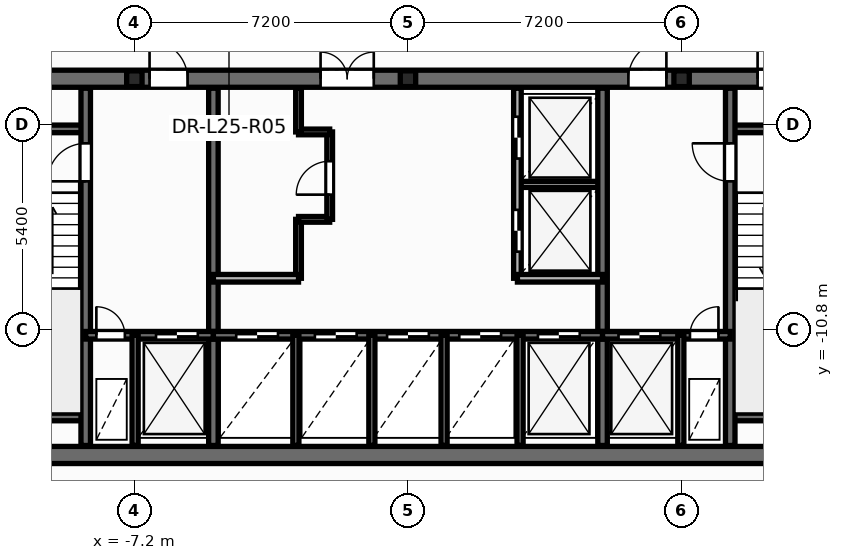
"""IFC4 building model, lengths in metres.
Left out: names, types, materials, properties, quantities, classifications, styles, units other than length and angle.
Written with IfcOpenShell. Run it as: python <this file> out.ifc"""

import sys

from ifc_helpers import new_model, si_unit, direction, frame, frame_2d, origin, origin_2d, place, context, subcontext, project, spatial, rectangle, i_section, extrude, element, fill, save


model = new_model("IFC4")
c1 = context("Model", 3, precision=1e-05, world=origin(), true_north=direction((0.0, 1.0)))
c2 = subcontext(c1, "Body", "Model", "MODEL_VIEW")
j1 = project(units=[si_unit("LENGTHUNIT", "METRE"), si_unit("PLANEANGLEUNIT", "RADIAN")], contexts=[c1])
p1 = place(None, origin())
s1 = spatial("IfcSite", under=j1, at=p1, CompositionType="ELEMENT")
p2 = place(p1, origin())
s2 = spatial("IfcBuilding", under=s1, at=p2, CompositionType="ELEMENT")
p3 = place(p2, frame((0.0, 0.0, 99.6)))
s3 = spatial("IfcBuildingStorey", under=s2, at=p3, CompositionType="ELEMENT", Elevation=99.6)
for number, where, z_axis, x_axis in (
    (1, (-7.2, -4.2, 0.0), (0.0, 0.0, 1.0), (1.0, 0.0, 0.0)),
    (2, (0.0, -4.2, 0.0), (0.0, 0.0, 1.0), (1.0, 0.0, 0.0)),
    (3, (7.2, -4.2, 0.0), (0.0, 0.0, 1.0), (1.0, 0.0, 0.0)),
):
    element("IfcColumn", number, at=place(p3, frame(where, z_axis=z_axis, x_axis=x_axis)), inside=s3, PredefinedType="PILASTER", context=c2, shape_type="SweptSolid", body=[
        extrude(i_section(OverallWidth=0.405, OverallDepth=0.414, WebThickness=0.022, FlangeThickness=0.032, at=origin_2d()), origin(), (0.0, 0.0, 1.0), 3.6),
    ])
p4 = place(p3, frame((-2.88, -9.45, 0.0), z_axis=(0.0, 0.0, 1.0), x_axis=(0.0, 1.0, 0.0)))
e4 = element("IfcWall", 4, at=p4, inside=s3, PredefinedType="PARTITIONING", context=c2, shape_type="SweptSolid", body=[
    extrude(rectangle(XDim=1.55, YDim=0.15, at=frame_2d((0.775, 0.0))), origin(), (0.0, 0.0, 1.0), 3.35),
])
p5 = place(p3, frame((-2.88, -7.9, 0.0), z_axis=(0.0, 0.0, 1.0), x_axis=(1.0, 0.0, 0.0)))
e5 = element("IfcWall", 5, at=p5, inside=s3, PredefinedType="PARTITIONING", context=c2, shape_type="SweptSolid", body=[
    extrude(rectangle(XDim=0.82, YDim=0.15, at=frame_2d((0.41, 0.0))), origin(), (0.0, 0.0, 1.0), 3.35),
])
p6 = place(p3, frame((-2.06, -7.9, 0.0), z_axis=(0.0, 0.0, 1.0), x_axis=(0.0, 1.0, 0.0)))
e6 = element("IfcWall", 6, at=p6, inside=s3, PredefinedType="PARTITIONING", context=c2, shape_type="SweptSolid", body=[
    extrude(rectangle(XDim=2.3, YDim=0.15, at=frame_2d((1.15, 0.0))), origin(), (0.0, 0.0, 1.0), 3.35),
])
p7 = place(p6, frame((0.65, 0.0, 0.0)))
e7 = element("IfcOpeningElement", 7, at=p7, cuts=e6, PredefinedType="OPENING", context=c2, shape_type="SweptSolid", body=[
    extrude(rectangle(XDim=0.886, YDim=2.104, at=frame_2d((0.44, 1.052))), frame((0.0, 0.085, 0.0), z_axis=(0.0, -1.0, 0.0), x_axis=(1.0, 0.0, 0.0)), (0.0, 0.0, 1.0), 0.17),
])
p8 = place(p3, frame((-2.88, -5.6, 0.0), z_axis=(0.0, 0.0, 1.0), x_axis=(1.0, 0.0, 0.0)))
e8 = element("IfcWall", 8, at=p8, inside=s3, PredefinedType="PARTITIONING", context=c2, shape_type="SweptSolid", body=[
    extrude(rectangle(XDim=0.82, YDim=0.15, at=frame_2d((0.41, 0.0))), origin(), (0.0, 0.0, 1.0), 3.35),
])
p9 = place(p3, frame((-2.88, -5.6, 0.0), z_axis=(0.0, 0.0, 1.0), x_axis=(0.0, 1.0, 0.0)))
e9 = element("IfcWall", 9, at=p9, inside=s3, PredefinedType="PARTITIONING", context=c2, shape_type="SweptSolid", body=[
    extrude(rectangle(XDim=1.15, YDim=0.15, at=frame_2d((0.575, 0.0))), origin(), (0.0, 0.0, 1.0), 3.35),
])
p10 = place(p3, frame((2.88, -6.98, 0.0), z_axis=(0.0, 0.0, 1.0), x_axis=(1.0, 0.0, 0.0)))
e10 = element("IfcWall", 10, at=p10, inside=s3, PredefinedType="PARTITIONING", context=c2, shape_type="SweptSolid", body=[
    extrude(rectangle(XDim=2.24, YDim=0.16, at=frame_2d((1.12, 0.0))), origin(), (0.0, 0.0, 1.0), 3.35),
])
p11 = place(p3, frame((-12.65, -14.1, 0.0), z_axis=(0.0, 0.0, 1.0), x_axis=(1.0, 0.0, 0.0)))
e11 = element("IfcWall", 11, at=p11, inside=s3, PredefinedType="SHEAR", context=c2, shape_type="SweptSolid", body=[
    extrude(rectangle(XDim=25.3, YDim=0.45, at=frame_2d((12.65, 0.0))), origin(), (0.0, 0.0, 1.0), 3.6),
])
p12 = place(p3, frame((-12.65, -4.2, 0.0), z_axis=(0.0, 0.0, 1.0), x_axis=(1.0, 0.0, 0.0)))
e12 = element("IfcWall", 12, at=p12, inside=s3, PredefinedType="SHEAR", context=c2, shape_type="SweptSolid", body=[
    extrude(rectangle(XDim=25.3, YDim=0.45, at=frame_2d((12.65, 0.0))), origin(), (0.0, 0.0, 1.0), 3.6),
])
p13 = place(p12, frame((1.85, 0.0, 0.0)))
e13 = element("IfcOpeningElement", 13, at=p13, cuts=e12, PredefinedType="OPENING", context=c2, shape_type="SweptSolid", body=[
    extrude(rectangle(XDim=0.756, YDim=2.054, at=frame_2d((0.375, 1.027))), frame((0.0, 0.235, 0.0), z_axis=(0.0, -1.0, 0.0), x_axis=(1.0, 0.0, 0.0)), (0.0, 0.0, 1.0), 0.47),
])
p14 = place(p12, frame((21.85, 0.0, 0.0)))
e14 = element("IfcOpeningElement", 14, at=p14, cuts=e12, PredefinedType="OPENING", context=c2, shape_type="SweptSolid", body=[
    extrude(rectangle(XDim=0.756, YDim=2.054, at=frame_2d((0.375, 1.027))), frame((0.0, 0.235, 0.0), z_axis=(0.0, -1.0, 0.0), x_axis=(1.0, 0.0, 0.0)), (0.0, 0.0, 1.0), 0.47),
])
p15 = place(p12, frame((23.5, 0.0, 0.0)))
e15 = element("IfcOpeningElement", 15, at=p15, cuts=e12, PredefinedType="OPENING", context=c2, shape_type="SweptSolid", body=[
    extrude(rectangle(XDim=0.756, YDim=2.054, at=frame_2d((0.375, 1.027))), frame((0.0, 0.235, 0.0), z_axis=(0.0, -1.0, 0.0), x_axis=(1.0, 0.0, 0.0)), (0.0, 0.0, 1.0), 0.47),
])
p16 = place(p12, frame((5.85, 0.0, 0.0)))
e16 = element("IfcOpeningElement", 16, at=p16, cuts=e12, PredefinedType="OPENING", context=c2, shape_type="SweptSolid", body=[
    extrude(rectangle(XDim=1.006, YDim=2.104, at=frame_2d((0.5, 1.052))), frame((0.0, 0.235, 0.0), z_axis=(0.0, -1.0, 0.0), x_axis=(1.0, 0.0, 0.0)), (0.0, 0.0, 1.0), 0.47),
])
p17 = place(p12, frame((10.35, 0.0, 0.0)))
e17 = element("IfcOpeningElement", 17, at=p17, cuts=e12, PredefinedType="OPENING", context=c2, shape_type="SweptSolid", body=[
    extrude(rectangle(XDim=1.406, YDim=2.154, at=frame_2d((0.7, 1.077))), frame((0.0, 0.235, 0.0), z_axis=(0.0, -1.0, 0.0), x_axis=(1.0, 0.0, 0.0)), (0.0, 0.0, 1.0), 0.47),
])
p18 = place(p12, frame((18.45, 0.0, 0.0)))
e18 = element("IfcOpeningElement", 18, at=p18, cuts=e12, PredefinedType="OPENING", context=c2, shape_type="SweptSolid", body=[
    extrude(rectangle(XDim=1.006, YDim=2.104, at=frame_2d((0.5, 1.052))), frame((0.0, 0.235, 0.0), z_axis=(0.0, -1.0, 0.0), x_axis=(1.0, 0.0, 0.0)), (0.0, 0.0, 1.0), 0.47),
])
for number, where, z_axis, x_axis in (
    (19, (-12.35, -5.52, 0.0), (0.0, 0.0, 1.0), (1.0, 0.0, 0.0)),
    (20, (-12.35, -13.1, 0.0), (0.0, 0.0, 1.0), (1.0, 0.0, 0.0)),
    (21, (8.48, -5.52, 0.0), (0.0, 0.0, 1.0), (1.0, 0.0, 0.0)),
    (22, (8.48, -13.1, 0.0), (0.0, 0.0, 1.0), (1.0, 0.0, 0.0)),
):
    element("IfcWall", number, at=place(p3, frame(where, z_axis=z_axis, x_axis=x_axis)), inside=s3, PredefinedType="SOLIDWALL", context=c2, shape_type="SweptSolid", body=[
        extrude(rectangle(XDim=3.87, YDim=0.2, at=frame_2d((1.935, 0.0))), origin(), (0.0, 0.0, 1.0), 3.6),
    ])
p19 = place(p3, frame((-8.48, -13.85, 0.0), z_axis=(0.0, 0.0, 1.0), x_axis=(0.0, 1.0, 0.0)))
e23 = element("IfcWall", 23, at=p19, inside=s3, PredefinedType="SHEAR", context=c2, shape_type="SweptSolid", body=[
    extrude(rectangle(XDim=9.4, YDim=0.25, at=frame_2d((4.7, 0.0))), origin(), (0.0, 0.0, 1.0), 3.6),
])
p20 = place(p19, frame((6.95, 0.0, 0.0)))
e24 = element("IfcOpeningElement", 24, at=p20, cuts=e23, PredefinedType="OPENING", context=c2, shape_type="SweptSolid", body=[
    extrude(rectangle(XDim=1.006, YDim=2.104, at=frame_2d((0.5, 1.052))), frame((0.0, 0.135, 0.0), z_axis=(0.0, -1.0, 0.0), x_axis=(1.0, 0.0, 0.0)), (0.0, 0.0, 1.0), 0.27),
])
p21 = place(p3, frame((8.48, -13.85, 0.0), z_axis=(0.0, 0.0, 1.0), x_axis=(0.0, 1.0, 0.0)))
e25 = element("IfcWall", 25, at=p21, inside=s3, PredefinedType="SHEAR", context=c2, shape_type="SweptSolid", body=[
    extrude(rectangle(XDim=9.4, YDim=0.25, at=frame_2d((4.7, 0.0))), origin(), (0.0, 0.0, 1.0), 3.6),
])
p22 = place(p21, frame((6.95, 0.0, 0.0)))
e26 = element("IfcOpeningElement", 26, at=p22, cuts=e25, PredefinedType="OPENING", context=c2, shape_type="SweptSolid", body=[
    extrude(rectangle(XDim=1.006, YDim=2.104, at=frame_2d((0.5, 1.052))), frame((0.0, 0.135, 0.0), z_axis=(0.0, -1.0, 0.0), x_axis=(1.0, 0.0, 0.0)), (0.0, 0.0, 1.0), 0.27),
])
for number, where, z_axis, x_axis in (
    (27, (-5.12, -13.85, 0.0), (0.0, 0.0, 1.0), (0.0, 1.0, 0.0)),
    (28, (5.12, -13.85, 0.0), (0.0, 0.0, 1.0), (0.0, 1.0, 0.0)),
):
    element("IfcWall", number, at=place(p3, frame(where, z_axis=z_axis, x_axis=x_axis)), inside=s3, PredefinedType="SHEAR", context=c2, shape_type="SweptSolid", body=[
        extrude(rectangle(XDim=9.4, YDim=0.25, at=frame_2d((4.7, 0.0))), origin(), (0.0, 0.0, 1.0), 3.6),
    ])
p23 = place(p3, frame((-8.48, -10.95, 0.0), z_axis=(0.0, 0.0, 1.0), x_axis=(1.0, 0.0, 0.0)))
e29 = element("IfcWall", 29, at=p23, inside=s3, PredefinedType="SOLIDWALL", context=c2, shape_type="SweptSolid", body=[
    extrude(rectangle(XDim=3.36, YDim=0.2, at=frame_2d((1.68, 0.0))), origin(), (0.0, 0.0, 1.0), 3.6),
])
p24 = place(p23, frame((0.28, 0.0, 0.0)))
e30 = element("IfcOpeningElement", 30, at=p24, cuts=e29, PredefinedType="OPENING", context=c2, shape_type="SweptSolid", body=[
    extrude(rectangle(XDim=0.756, YDim=2.054, at=frame_2d((0.375, 1.027))), frame((0.0, 0.11, 0.0), z_axis=(0.0, -1.0, 0.0), x_axis=(1.0, 0.0, 0.0)), (0.0, 0.0, 1.0), 0.22),
])
p25 = place(p23, frame((1.85, 0.0, 0.0)))
e31 = element("IfcOpeningElement", 31, at=p25, cuts=e29, PredefinedType="OPENING", context=c2, shape_type="SweptSolid", body=[
    extrude(rectangle(XDim=1.106, YDim=2.104, at=frame_2d((0.55, 1.052))), frame((0.0, 0.11, 0.0), z_axis=(0.0, -1.0, 0.0), x_axis=(1.0, 0.0, 0.0)), (0.0, 0.0, 1.0), 0.22),
])
p26 = place(p3, frame((-5.12, -10.95, 0.0), z_axis=(0.0, 0.0, 1.0), x_axis=(1.0, 0.0, 0.0)))
e32 = element("IfcWall", 32, at=p26, inside=s3, PredefinedType="SOLIDWALL", context=c2, shape_type="SweptSolid", body=[
    extrude(rectangle(XDim=10.24, YDim=0.2, at=frame_2d((5.12, 0.0))), origin(), (0.0, 0.0, 1.0), 3.6),
])
p27 = place(p26, frame((0.6, 0.0, 0.0)))
e33 = element("IfcOpeningElement", 33, at=p27, cuts=e32, PredefinedType="OPENING", context=c2, shape_type="SweptSolid", body=[
    extrude(rectangle(XDim=1.106, YDim=2.104, at=frame_2d((0.55, 1.052))), frame((0.0, 0.11, 0.0), z_axis=(0.0, -1.0, 0.0), x_axis=(1.0, 0.0, 0.0)), (0.0, 0.0, 1.0), 0.22),
])
p28 = place(p26, frame((2.67, 0.0, 0.0)))
e34 = element("IfcOpeningElement", 34, at=p28, cuts=e32, PredefinedType="OPENING", context=c2, shape_type="SweptSolid", body=[
    extrude(rectangle(XDim=1.106, YDim=2.104, at=frame_2d((0.55, 1.052))), frame((0.0, 0.11, 0.0), z_axis=(0.0, -1.0, 0.0), x_axis=(1.0, 0.0, 0.0)), (0.0, 0.0, 1.0), 0.22),
])
p29 = place(p26, frame((4.57, 0.0, 0.0)))
e35 = element("IfcOpeningElement", 35, at=p29, cuts=e32, PredefinedType="OPENING", context=c2, shape_type="SweptSolid", body=[
    extrude(rectangle(XDim=1.106, YDim=2.104, at=frame_2d((0.55, 1.052))), frame((0.0, 0.11, 0.0), z_axis=(0.0, -1.0, 0.0), x_axis=(1.0, 0.0, 0.0)), (0.0, 0.0, 1.0), 0.22),
])
p30 = place(p26, frame((6.47, 0.0, 0.0)))
e36 = element("IfcOpeningElement", 36, at=p30, cuts=e32, PredefinedType="OPENING", context=c2, shape_type="SweptSolid", body=[
    extrude(rectangle(XDim=1.106, YDim=2.104, at=frame_2d((0.55, 1.052))), frame((0.0, 0.11, 0.0), z_axis=(0.0, -1.0, 0.0), x_axis=(1.0, 0.0, 0.0)), (0.0, 0.0, 1.0), 0.22),
])
p31 = place(p26, frame((8.54, 0.0, 0.0)))
e37 = element("IfcOpeningElement", 37, at=p31, cuts=e32, PredefinedType="OPENING", context=c2, shape_type="SweptSolid", body=[
    extrude(rectangle(XDim=1.106, YDim=2.104, at=frame_2d((0.55, 1.052))), frame((0.0, 0.11, 0.0), z_axis=(0.0, -1.0, 0.0), x_axis=(1.0, 0.0, 0.0)), (0.0, 0.0, 1.0), 0.22),
])
p32 = place(p3, frame((5.12, -10.95, 0.0), z_axis=(0.0, 0.0, 1.0), x_axis=(1.0, 0.0, 0.0)))
e38 = element("IfcWall", 38, at=p32, inside=s3, PredefinedType="SOLIDWALL", context=c2, shape_type="SweptSolid", body=[
    extrude(rectangle(XDim=3.36, YDim=0.2, at=frame_2d((1.68, 0.0))), origin(), (0.0, 0.0, 1.0), 3.6),
])
p33 = place(p32, frame((0.42, 0.0, 0.0)))
e39 = element("IfcOpeningElement", 39, at=p33, cuts=e38, PredefinedType="OPENING", context=c2, shape_type="SweptSolid", body=[
    extrude(rectangle(XDim=1.106, YDim=2.104, at=frame_2d((0.55, 1.052))), frame((0.0, 0.11, 0.0), z_axis=(0.0, -1.0, 0.0), x_axis=(1.0, 0.0, 0.0)), (0.0, 0.0, 1.0), 0.22),
])
p34 = place(p32, frame((2.3, 0.0, 0.0)))
e40 = element("IfcOpeningElement", 40, at=p34, cuts=e38, PredefinedType="OPENING", context=c2, shape_type="SweptSolid", body=[
    extrude(rectangle(XDim=0.756, YDim=2.054, at=frame_2d((0.375, 1.027))), frame((0.0, 0.11, 0.0), z_axis=(0.0, -1.0, 0.0), x_axis=(1.0, 0.0, 0.0)), (0.0, 0.0, 1.0), 0.22),
])
for number, where, z_axis, x_axis in (
    (41, (-7.18, -13.85, 0.0), (0.0, 0.0, 1.0), (0.0, 1.0, 0.0)),
    (42, (7.18, -13.85, 0.0), (0.0, 0.0, 1.0), (0.0, 1.0, 0.0)),
    (43, (-2.95, -13.85, 0.0), (0.0, 0.0, 1.0), (0.0, 1.0, 0.0)),
    (44, (2.95, -13.85, 0.0), (0.0, 0.0, 1.0), (0.0, 1.0, 0.0)),
):
    element("IfcWall", number, at=place(p3, frame(where, z_axis=z_axis, x_axis=x_axis)), inside=s3, PredefinedType="PARTITIONING", context=c2, shape_type="SweptSolid", body=[
        extrude(rectangle(XDim=2.9, YDim=0.16, at=frame_2d((1.45, 0.0))), origin(), (0.0, 0.0, 1.0), 2.375),
    ])
p35 = place(p3, frame((-5.12, -9.45, 0.0), z_axis=(0.0, 0.0, 1.0), x_axis=(1.0, 0.0, 0.0)))
e45 = element("IfcWall", 45, at=p35, inside=s3, PredefinedType="SOLIDWALL", context=c2, shape_type="SweptSolid", body=[
    extrude(rectangle(XDim=2.24, YDim=0.2, at=frame_2d((1.12, 0.0))), origin(), (0.0, 0.0, 1.0), 3.35),
])
p36 = place(p3, frame((2.88, -9.45, 0.0), z_axis=(0.0, 0.0, 1.0), x_axis=(0.0, 1.0, 0.0)))
e46 = element("IfcWall", 46, at=p36, inside=s3, PredefinedType="SOLIDWALL", context=c2, shape_type="SweptSolid", body=[
    extrude(rectangle(XDim=5.0, YDim=0.2, at=frame_2d((2.5, 0.0))), origin(), (0.0, 0.0, 1.0), 3.35),
])
p37 = place(p36, frame((0.7, 0.0, 0.0)))
e47 = element("IfcOpeningElement", 47, at=p37, cuts=e46, PredefinedType="OPENING", context=c2, shape_type="SweptSolid", body=[
    extrude(rectangle(XDim=1.106, YDim=2.104, at=frame_2d((0.55, 1.052))), frame((0.0, 0.11, 0.0), z_axis=(0.0, -1.0, 0.0), x_axis=(1.0, 0.0, 0.0)), (0.0, 0.0, 1.0), 0.22),
])
p38 = place(p36, frame((3.15, 0.0, 0.0)))
e48 = element("IfcOpeningElement", 48, at=p38, cuts=e46, PredefinedType="OPENING", context=c2, shape_type="SweptSolid", body=[
    extrude(rectangle(XDim=1.106, YDim=2.104, at=frame_2d((0.55, 1.052))), frame((0.0, 0.11, 0.0), z_axis=(0.0, -1.0, 0.0), x_axis=(1.0, 0.0, 0.0)), (0.0, 0.0, 1.0), 0.22),
])
p39 = place(p3, frame((2.88, -9.45, 0.0), z_axis=(0.0, 0.0, 1.0), x_axis=(1.0, 0.0, 0.0)))
e49 = element("IfcWall", 49, at=p39, inside=s3, PredefinedType="SOLIDWALL", context=c2, shape_type="SweptSolid", body=[
    extrude(rectangle(XDim=2.24, YDim=0.2, at=frame_2d((1.12, 0.0))), origin(), (0.0, 0.0, 1.0), 3.35),
])
for number, where, z_axis, x_axis in (
    (50, (-0.95, -13.85, 0.0), (0.0, 0.0, 1.0), (0.0, 1.0, 0.0)),
    (51, (0.95, -13.85, 0.0), (0.0, 0.0, 1.0), (0.0, 1.0, 0.0)),
):
    element("IfcWall", number, at=place(p3, frame(where, z_axis=z_axis, x_axis=x_axis)), inside=s3, PredefinedType="PARTITIONING", context=c2, shape_type="SweptSolid", body=[
        extrude(rectangle(XDim=2.9, YDim=0.16, at=frame_2d((1.45, 0.0))), origin(), (0.0, 0.0, 1.0), 2.375),
    ])
p40 = place(p7, origin())
e52 = element("IfcDoor", 52, at=p40, inside=s3, OperationType="SINGLE_SWING_LEFT", PredefinedType="DOOR", context=c2, shape_type="SweptSolid", body=[
    extrude(rectangle(XDim=0.88, YDim=2.1, at=frame_2d((0.44, 1.05))), frame((0.0, 0.025, 0.0), z_axis=(0.0, -1.0, 0.0), x_axis=(1.0, 0.0, 0.0)), (0.0, 0.0, 1.0), 0.05),
])
fill(e7, e52)
p41 = place(p37, origin())
e53 = element("IfcDoor", 53, at=p41, inside=s3, OperationType="DOUBLE_DOOR_SLIDING", PredefinedType="DOOR", context=c2, shape_type="SweptSolid", body=[
    extrude(rectangle(XDim=1.1, YDim=2.1, at=frame_2d((0.55, 1.05))), frame((0.0, 0.025, 0.0), z_axis=(0.0, -1.0, 0.0), x_axis=(1.0, 0.0, 0.0)), (0.0, 0.0, 1.0), 0.05),
])
fill(e47, e53)
p42 = place(p38, origin())
e54 = element("IfcDoor", 54, at=p42, inside=s3, OperationType="DOUBLE_DOOR_SLIDING", PredefinedType="DOOR", context=c2, shape_type="SweptSolid", body=[
    extrude(rectangle(XDim=1.1, YDim=2.1, at=frame_2d((0.55, 1.05))), frame((0.0, 0.025, 0.0), z_axis=(0.0, -1.0, 0.0), x_axis=(1.0, 0.0, 0.0)), (0.0, 0.0, 1.0), 0.05),
])
fill(e48, e54)
p43 = place(p20, origin())
e55 = element("IfcDoor", 55, at=p43, inside=s3, OperationType="SINGLE_SWING_LEFT", PredefinedType="DOOR", context=c2, shape_type="SweptSolid", body=[
    extrude(rectangle(XDim=1.0, YDim=2.1, at=frame_2d((0.5, 1.05))), frame((0.0, 0.025, 0.0), z_axis=(0.0, -1.0, 0.0), x_axis=(1.0, 0.0, 0.0)), (0.0, 0.0, 1.0), 0.05),
])
fill(e24, e55)
p44 = place(p22, origin())
e56 = element("IfcDoor", 56, at=p44, inside=s3, OperationType="SINGLE_SWING_RIGHT", PredefinedType="DOOR", context=c2, shape_type="SweptSolid", body=[
    extrude(rectangle(XDim=1.0, YDim=2.1, at=frame_2d((0.5, 1.05))), frame((0.0, 0.025, 0.0), z_axis=(0.0, -1.0, 0.0), x_axis=(1.0, 0.0, 0.0)), (0.0, 0.0, 1.0), 0.05),
])
fill(e26, e56)
p45 = place(p24, origin())
e57 = element("IfcDoor", 57, at=p45, inside=s3, OperationType="SINGLE_SWING_LEFT", PredefinedType="DOOR", context=c2, shape_type="SweptSolid", body=[
    extrude(rectangle(XDim=0.75, YDim=2.05, at=frame_2d((0.375, 1.025))), frame((0.0, 0.025, 0.0), z_axis=(0.0, -1.0, 0.0), x_axis=(1.0, 0.0, 0.0)), (0.0, 0.0, 1.0), 0.05),
])
fill(e30, e57)
p46 = place(p25, origin())
e58 = element("IfcDoor", 58, at=p46, inside=s3, OperationType="DOUBLE_DOOR_SLIDING", PredefinedType="DOOR", context=c2, shape_type="SweptSolid", body=[
    extrude(rectangle(XDim=1.1, YDim=2.1, at=frame_2d((0.55, 1.05))), frame((0.0, 0.025, 0.0), z_axis=(0.0, -1.0, 0.0), x_axis=(1.0, 0.0, 0.0)), (0.0, 0.0, 1.0), 0.05),
])
fill(e31, e58)
p47 = place(p33, origin())
e59 = element("IfcDoor", 59, at=p47, inside=s3, OperationType="DOUBLE_DOOR_SLIDING", PredefinedType="DOOR", context=c2, shape_type="SweptSolid", body=[
    extrude(rectangle(XDim=1.1, YDim=2.1, at=frame_2d((0.55, 1.05))), frame((0.0, 0.025, 0.0), z_axis=(0.0, -1.0, 0.0), x_axis=(1.0, 0.0, 0.0)), (0.0, 0.0, 1.0), 0.05),
])
fill(e39, e59)
p48 = place(p34, origin())
e60 = element("IfcDoor", 60, at=p48, inside=s3, OperationType="SINGLE_SWING_RIGHT", PredefinedType="DOOR", context=c2, shape_type="SweptSolid", body=[
    extrude(rectangle(XDim=0.75, YDim=2.05, at=frame_2d((0.375, 1.025))), frame((0.0, 0.025, 0.0), z_axis=(0.0, -1.0, 0.0), x_axis=(1.0, 0.0, 0.0)), (0.0, 0.0, 1.0), 0.05),
])
fill(e40, e60)
p49 = place(p27, origin())
e61 = element("IfcDoor", 61, at=p49, inside=s3, OperationType="DOUBLE_DOOR_SLIDING", PredefinedType="DOOR", context=c2, shape_type="SweptSolid", body=[
    extrude(rectangle(XDim=1.1, YDim=2.1, at=frame_2d((0.55, 1.05))), frame((0.0, 0.025, 0.0), z_axis=(0.0, -1.0, 0.0), x_axis=(1.0, 0.0, 0.0)), (0.0, 0.0, 1.0), 0.05),
])
fill(e33, e61)
p50 = place(p28, origin())
e62 = element("IfcDoor", 62, at=p50, inside=s3, OperationType="DOUBLE_DOOR_SLIDING", PredefinedType="DOOR", context=c2, shape_type="SweptSolid", body=[
    extrude(rectangle(XDim=1.1, YDim=2.1, at=frame_2d((0.55, 1.05))), frame((0.0, 0.025, 0.0), z_axis=(0.0, -1.0, 0.0), x_axis=(1.0, 0.0, 0.0)), (0.0, 0.0, 1.0), 0.05),
])
fill(e34, e62)
p51 = place(p29, origin())
e63 = element("IfcDoor", 63, at=p51, inside=s3, OperationType="DOUBLE_DOOR_SLIDING", PredefinedType="DOOR", context=c2, shape_type="SweptSolid", body=[
    extrude(rectangle(XDim=1.1, YDim=2.1, at=frame_2d((0.55, 1.05))), frame((0.0, 0.025, 0.0), z_axis=(0.0, -1.0, 0.0), x_axis=(1.0, 0.0, 0.0)), (0.0, 0.0, 1.0), 0.05),
])
fill(e35, e63)
p52 = place(p30, origin())
e64 = element("IfcDoor", 64, at=p52, inside=s3, OperationType="DOUBLE_DOOR_SLIDING", PredefinedType="DOOR", context=c2, shape_type="SweptSolid", body=[
    extrude(rectangle(XDim=1.1, YDim=2.1, at=frame_2d((0.55, 1.05))), frame((0.0, 0.025, 0.0), z_axis=(0.0, -1.0, 0.0), x_axis=(1.0, 0.0, 0.0)), (0.0, 0.0, 1.0), 0.05),
])
fill(e36, e64)
p53 = place(p31, origin())
e65 = element("IfcDoor", 65, at=p53, inside=s3, OperationType="DOUBLE_DOOR_SLIDING", PredefinedType="DOOR", context=c2, shape_type="SweptSolid", body=[
    extrude(rectangle(XDim=1.1, YDim=2.1, at=frame_2d((0.55, 1.05))), frame((0.0, 0.025, 0.0), z_axis=(0.0, -1.0, 0.0), x_axis=(1.0, 0.0, 0.0)), (0.0, 0.0, 1.0), 0.05),
])
fill(e37, e65)
p54 = place(p14, origin())
e66 = element("IfcDoor", 66, at=p54, inside=s3, OperationType="SINGLE_SWING_LEFT", PredefinedType="DOOR", context=c2, shape_type="SweptSolid", body=[
    extrude(rectangle(XDim=0.75, YDim=2.05, at=frame_2d((0.375, 1.025))), frame((0.0, 0.025, 0.0), z_axis=(0.0, -1.0, 0.0), x_axis=(1.0, 0.0, 0.0)), (0.0, 0.0, 1.0), 0.05),
])
fill(e14, e66)
p55 = place(p16, origin())
e67 = element("IfcDoor", 67, at=p55, inside=s3, OperationType="SINGLE_SWING_LEFT", PredefinedType="DOOR", context=c2, shape_type="SweptSolid", body=[
    extrude(rectangle(XDim=1.0, YDim=2.1, at=frame_2d((0.5, 1.05))), frame((0.0, 0.025, 0.0), z_axis=(0.0, -1.0, 0.0), x_axis=(1.0, 0.0, 0.0)), (0.0, 0.0, 1.0), 0.05),
])
fill(e16, e67)
p56 = place(p17, origin())
e68 = element("IfcDoor", 68, at=p56, inside=s3, OperationType="DOUBLE_DOOR_SINGLE_SWING", PredefinedType="DOOR", context=c2, shape_type="SweptSolid", body=[
    extrude(rectangle(XDim=1.4, YDim=2.15, at=frame_2d((0.7, 1.075))), frame((0.0, 0.025, 0.0), z_axis=(0.0, -1.0, 0.0), x_axis=(1.0, 0.0, 0.0)), (0.0, 0.0, 1.0), 0.05),
])
fill(e17, e68)
p57 = place(p18, origin())
e69 = element("IfcDoor", 69, at=p57, inside=s3, OperationType="SINGLE_SWING_RIGHT", PredefinedType="DOOR", context=c2, shape_type="SweptSolid", body=[
    extrude(rectangle(XDim=1.0, YDim=2.1, at=frame_2d((0.5, 1.05))), frame((0.0, 0.025, 0.0), z_axis=(0.0, -1.0, 0.0), x_axis=(1.0, 0.0, 0.0)), (0.0, 0.0, 1.0), 0.05),
])
fill(e18, e69)
save(model, sys.argv[1])
